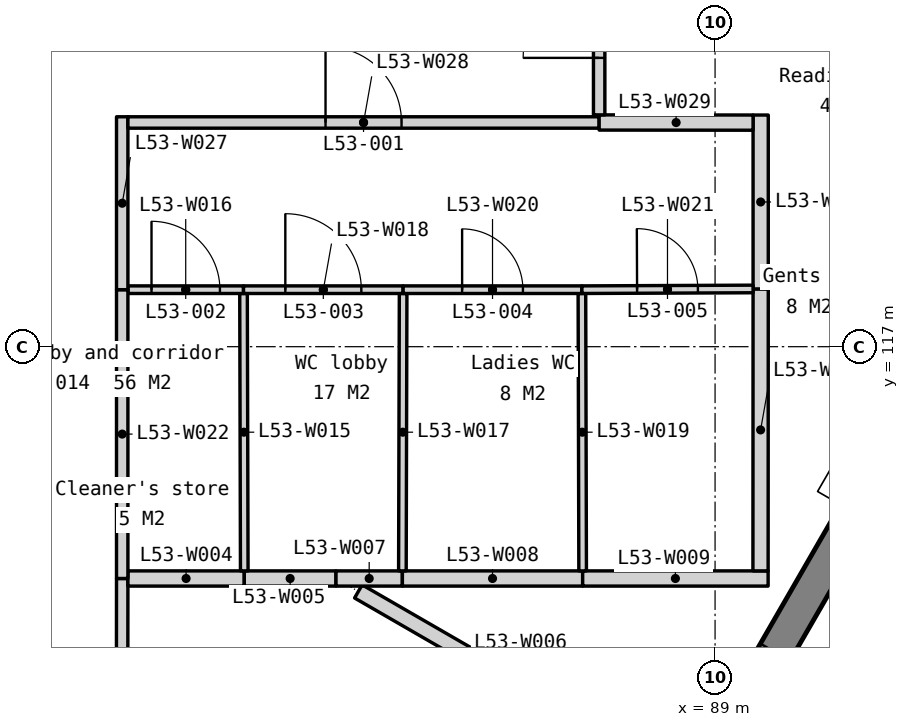
"""IFC4 building model, lengths in metres.
Left out: names, types, materials, properties, quantities, classifications, styles, units other than length and angle.
Written with IfcOpenShell. Run it as: python <this file> out.ifc"""

import sys

from ifc_helpers import new_model, si_unit, direction, frame, frame_2d, origin, place, context, subcontext, project, spatial, polyline, rectangle, outline, extrude, element, fill, save


model = new_model("IFC4")
c1 = context("Model", 3, precision=1e-05, world=origin(), true_north=direction((0.0, 1.0)))
c2 = subcontext(c1, "Body", "Model", "MODEL_VIEW")
j1 = project(units=[si_unit("LENGTHUNIT", "METRE"), si_unit("PLANEANGLEUNIT", "RADIAN")], contexts=[c1])
p1 = place(None, origin())
s1 = spatial("IfcSite", under=j1, at=p1, CompositionType="ELEMENT")
p2 = place(p1, origin())
s2 = spatial("IfcBuilding", under=s1, at=p2, CompositionType="ELEMENT")
p3 = place(p2, frame((0.0, 0.0, 211.4)))
s3 = spatial("IfcBuildingStorey", under=s2, at=p3, CompositionType="ELEMENT", Elevation=211.4)
p4 = place(p3, frame((81.505, 98.627, -0.15), z_axis=(0.0, 0.0, 1.0), x_axis=(0.500002199942, 0.866024133644, 0.0)))
e1 = element("IfcWall", 1, at=p4, inside=s3, PredefinedType="SOLIDWALL", context=c2, shape_type="SweptSolid", body=[
    extrude(outline(polyline([(38.729, 0.0), (38.729, 3.9), (0.0, 3.9), (0.0, 0.0), (38.729, 0.0)])), frame((0.0, 0.225, 0.0), z_axis=(0.0, -1.0, 0.0), x_axis=(1.0, 0.0, 0.0)), (0.0, 0.0, 1.0), 0.45),
])
p5 = place(p4, frame((2.791, 0.0, 0.95)))
e2 = element("IfcOpeningElement", 2, at=p5, cuts=e1, PredefinedType="OPENING", context=c2, shape_type="SweptSolid", body=[
    extrude(rectangle(XDim=1.8, YDim=2.2, at=frame_2d((0.9, 1.1))), frame((0.0, 0.235, 0.0), z_axis=(0.0, -1.0, 0.0), x_axis=(1.0, 0.0, 0.0)), (0.0, 0.0, 1.0), 0.47),
])
p6 = place(p4, frame((5.091, 0.0, 0.95)))
e3 = element("IfcOpeningElement", 3, at=p6, cuts=e1, PredefinedType="OPENING", context=c2, shape_type="SweptSolid", body=[
    extrude(rectangle(XDim=1.8, YDim=2.2, at=frame_2d((0.9, 1.1))), frame((0.0, 0.235, 0.0), z_axis=(0.0, -1.0, 0.0), x_axis=(1.0, 0.0, 0.0)), (0.0, 0.0, 1.0), 0.47),
])
p7 = place(p4, frame((12.473, 0.0, 0.95)))
e4 = element("IfcOpeningElement", 4, at=p7, cuts=e1, PredefinedType="OPENING", context=c2, shape_type="SweptSolid", body=[
    extrude(rectangle(XDim=1.8, YDim=2.2, at=frame_2d((0.9, 1.1))), frame((0.0, 0.235, 0.0), z_axis=(0.0, -1.0, 0.0), x_axis=(1.0, 0.0, 0.0)), (0.0, 0.0, 1.0), 0.47),
])
p8 = place(p4, frame((14.773, 0.0, 0.95)))
e5 = element("IfcOpeningElement", 5, at=p8, cuts=e1, PredefinedType="OPENING", context=c2, shape_type="SweptSolid", body=[
    extrude(rectangle(XDim=1.8, YDim=2.2, at=frame_2d((0.9, 1.1))), frame((0.0, 0.235, 0.0), z_axis=(0.0, -1.0, 0.0), x_axis=(1.0, 0.0, 0.0)), (0.0, 0.0, 1.0), 0.47),
])
p9 = place(p4, frame((22.156, 0.0, 0.95)))
e6 = element("IfcOpeningElement", 6, at=p9, cuts=e1, PredefinedType="OPENING", context=c2, shape_type="SweptSolid", body=[
    extrude(rectangle(XDim=1.8, YDim=2.2, at=frame_2d((0.9, 1.1))), frame((0.0, 0.235, 0.0), z_axis=(0.0, -1.0, 0.0), x_axis=(1.0, 0.0, 0.0)), (0.0, 0.0, 1.0), 0.47),
])
p10 = place(p4, frame((24.456, 0.0, 0.95)))
e7 = element("IfcOpeningElement", 7, at=p10, cuts=e1, PredefinedType="OPENING", context=c2, shape_type="SweptSolid", body=[
    extrude(rectangle(XDim=1.8, YDim=2.2, at=frame_2d((0.9, 1.1))), frame((0.0, 0.235, 0.0), z_axis=(0.0, -1.0, 0.0), x_axis=(1.0, 0.0, 0.0)), (0.0, 0.0, 1.0), 0.47),
])
p11 = place(p4, frame((31.838, 0.0, 0.95)))
e8 = element("IfcOpeningElement", 8, at=p11, cuts=e1, PredefinedType="OPENING", context=c2, shape_type="SweptSolid", body=[
    extrude(rectangle(XDim=1.8, YDim=2.2, at=frame_2d((0.9, 1.1))), frame((0.0, 0.235, 0.0), z_axis=(0.0, -1.0, 0.0), x_axis=(1.0, 0.0, 0.0)), (0.0, 0.0, 1.0), 0.47),
])
p12 = place(p4, frame((34.138, 0.0, 0.95)))
e9 = element("IfcOpeningElement", 9, at=p12, cuts=e1, PredefinedType="OPENING", context=c2, shape_type="SweptSolid", body=[
    extrude(rectangle(XDim=1.8, YDim=2.2, at=frame_2d((0.9, 1.1))), frame((0.0, 0.235, 0.0), z_axis=(0.0, -1.0, 0.0), x_axis=(1.0, 0.0, 0.0)), (0.0, 0.0, 1.0), 0.47),
])
p13 = place(p3, frame((81.198, 111.842, 0.0), z_axis=(0.0, 0.0, 1.0), x_axis=(0.000926461675, 0.999999570834, 0.0)))
e10 = element("IfcWall", 10, at=p13, inside=s3, PredefinedType="PARTITIONING", context=c2, shape_type="SweptSolid", body=[
    extrude(rectangle(XDim=2.108, YDim=0.15, at=frame_2d((1.054, 0.0))), origin(), (0.0, 0.0, 1.0), 3.75),
])
p14 = place(p3, frame((81.275, 113.95, 0.0), z_axis=(0.0, 0.0, 1.0), x_axis=(1.0, 0.0, 0.0)))
e11 = element("IfcWall", 11, at=p14, inside=s3, PredefinedType="PARTITIONING", context=c2, shape_type="SweptSolid", body=[
    extrude(rectangle(XDim=1.531, YDim=0.2, at=frame_2d((0.766, 0.0))), origin(), (0.0, 0.0, 1.0), 3.75),
])
p15 = place(p3, frame((82.806, 113.95, 0.0), z_axis=(0.0, 0.0, 1.0), x_axis=(1.0, 0.0, 0.0)))
e12 = element("IfcWall", 12, at=p15, inside=s3, PredefinedType="PARTITIONING", context=c2, shape_type="SweptSolid", body=[
    extrude(rectangle(XDim=1.207, YDim=0.2, at=frame_2d((0.604, 0.0))), origin(), (0.0, 0.0, 1.0), 3.75),
])
p16 = place(p3, frame((84.307, 113.78, 0.0), z_axis=(0.0, 0.0, 1.0), x_axis=(0.86601964755, -0.500009969958, 0.0)))
e13 = element("IfcWall", 13, at=p16, inside=s3, PredefinedType="PARTITIONING", context=c2, shape_type="SweptSolid", body=[
    extrude(rectangle(XDim=4.925, YDim=0.2, at=frame_2d((2.462, 0.0))), origin(), (0.0, 0.0, 1.0), 3.75),
])
p17 = place(p3, frame((84.013, 113.95, 0.0), z_axis=(0.0, 0.0, 1.0), x_axis=(1.0, 0.0, 0.0)))
e14 = element("IfcWall", 14, at=p17, inside=s3, PredefinedType="PARTITIONING", context=c2, shape_type="SweptSolid", body=[
    extrude(rectangle(XDim=0.873, YDim=0.2, at=frame_2d((0.437, 0.0))), origin(), (0.0, 0.0, 1.0), 3.75),
])
p18 = place(p3, frame((84.886, 113.95, 0.0), z_axis=(0.0, 0.0, 1.0), x_axis=(1.0, 0.0, 0.0)))
e15 = element("IfcWall", 15, at=p18, inside=s3, PredefinedType="PARTITIONING", context=c2, shape_type="SweptSolid", body=[
    extrude(rectangle(XDim=2.372, YDim=0.2, at=frame_2d((1.186, 0.0))), origin(), (0.0, 0.0, 1.0), 3.75),
])
p19 = place(p3, frame((87.258, 113.95, 0.0), z_axis=(0.0, 0.0, 1.0), x_axis=(1.0, 0.0, 0.0)))
e16 = element("IfcWall", 16, at=p19, inside=s3, PredefinedType="PARTITIONING", context=c2, shape_type="SweptSolid", body=[
    extrude(rectangle(XDim=2.44, YDim=0.2, at=frame_2d((1.22, 0.0))), origin(), (0.0, 0.0, 1.0), 3.75),
])
p20 = place(p3, frame((89.598, 114.05, 0.0), z_axis=(0.0, 0.0, 1.0), x_axis=(0.000526454257, 0.999999861423, 0.0)))
e17 = element("IfcWall", 17, at=p20, inside=s3, PredefinedType="PARTITIONING", context=c2, shape_type="SweptSolid", body=[
    extrude(rectangle(XDim=3.71, YDim=0.2, at=frame_2d((1.855, 0.0))), origin(), (0.0, 0.0, 1.0), 3.75),
])
p21 = place(p3, frame((89.6, 117.76, 0.0), z_axis=(0.0, 0.0, 1.0), x_axis=(0.0, 1.0, 0.0)))
e18 = element("IfcWall", 18, at=p21, inside=s3, PredefinedType="PARTITIONING", context=c2, shape_type="SweptSolid", body=[
    extrude(rectangle(XDim=2.288, YDim=0.2, at=frame_2d((1.144, 0.0))), origin(), (0.0, 0.0, 1.0), 3.75),
])
p22 = place(p3, frame((82.806, 114.05, 0.0), z_axis=(0.0, 0.0, 1.0), x_axis=(-0.002608686776, 0.999996597371, 0.0)))
e19 = element("IfcWall", 19, at=p22, inside=s3, PredefinedType="PARTITIONING", context=c2, shape_type="SweptSolid", body=[
    extrude(rectangle(XDim=3.65, YDim=0.1, at=frame_2d((1.825, 0.0))), origin(), (0.0, 0.0, 1.0), 3.75),
])
p23 = place(p3, frame((81.275, 117.75, 0.0), z_axis=(0.0, 0.0, 1.0), x_axis=(1.0, 0.0, 0.0)))
e20 = element("IfcWall", 20, at=p23, inside=s3, PredefinedType="PARTITIONING", context=c2, shape_type="SweptSolid", body=[
    extrude(rectangle(XDim=1.521, YDim=0.1, at=frame_2d((0.76, 0.0))), origin(), (0.0, 0.0, 1.0), 3.75),
])
p24 = place(p23, frame((0.311, 0.0, 0.0)))
e21 = element("IfcOpeningElement", 21, at=p24, cuts=e20, PredefinedType="OPENING", context=c2, shape_type="SweptSolid", body=[
    extrude(rectangle(XDim=0.9, YDim=2.1, at=frame_2d((0.45, 1.05))), frame((0.0, 0.06, 0.0), z_axis=(0.0, -1.0, 0.0), x_axis=(1.0, 0.0, 0.0)), (0.0, 0.0, 1.0), 0.12),
])
p25 = place(p3, frame((84.886, 114.05, 0.0), z_axis=(0.0, 0.0, 1.0), x_axis=(0.002608686776, 0.999996597371, 0.0)))
e22 = element("IfcWall", 22, at=p25, inside=s3, PredefinedType="PARTITIONING", context=c2, shape_type="SweptSolid", body=[
    extrude(rectangle(XDim=3.65, YDim=0.1, at=frame_2d((1.825, 0.0))), origin(), (0.0, 0.0, 1.0), 3.75),
])
p26 = place(p3, frame((82.796, 117.75, 0.0), z_axis=(0.0, 0.0, 1.0), x_axis=(1.0, 0.0, 0.0)))
e23 = element("IfcWall", 23, at=p26, inside=s3, PredefinedType="PARTITIONING", context=c2, shape_type="SweptSolid", body=[
    extrude(rectangle(XDim=2.1, YDim=0.1, at=frame_2d((1.05, 0.0))), origin(), (0.0, 0.0, 1.0), 3.75),
])
p27 = place(p26, frame((0.55, 0.0, 0.0)))
e24 = element("IfcOpeningElement", 24, at=p27, cuts=e23, PredefinedType="OPENING", context=c2, shape_type="SweptSolid", body=[
    extrude(rectangle(XDim=1.0, YDim=2.1, at=frame_2d((0.5, 1.05))), frame((0.0, 0.06, 0.0), z_axis=(0.0, -1.0, 0.0), x_axis=(1.0, 0.0, 0.0)), (0.0, 0.0, 1.0), 0.12),
])
p28 = place(p3, frame((87.258, 114.05, 0.0), z_axis=(0.0, 0.0, 1.0), x_axis=(-0.002675575707, 0.999996420641, 0.0)))
e25 = element("IfcWall", 25, at=p28, inside=s3, PredefinedType="PARTITIONING", context=c2, shape_type="SweptSolid", body=[
    extrude(rectangle(XDim=3.65, YDim=0.1, at=frame_2d((1.825, 0.0))), origin(), (0.0, 0.0, 1.0), 3.75),
])
p29 = place(p3, frame((84.896, 117.75, 0.0), z_axis=(0.0, 0.0, 1.0), x_axis=(1.0, 0.0, 0.0)))
e26 = element("IfcWall", 26, at=p29, inside=s3, PredefinedType="PARTITIONING", context=c2, shape_type="SweptSolid", body=[
    extrude(rectangle(XDim=2.352, YDim=0.1, at=frame_2d((1.176, 0.0))), origin(), (0.0, 0.0, 1.0), 3.75),
])
p30 = place(p29, frame((0.776, 0.0, 0.0)))
e27 = element("IfcOpeningElement", 27, at=p30, cuts=e26, PredefinedType="OPENING", context=c2, shape_type="SweptSolid", body=[
    extrude(rectangle(XDim=0.8, YDim=2.1, at=frame_2d((0.4, 1.05))), frame((0.0, 0.06, 0.0), z_axis=(0.0, -1.0, 0.0), x_axis=(1.0, 0.0, 0.0)), (0.0, 0.0, 1.0), 0.12),
])
p31 = place(p3, frame((87.248, 117.75, 0.0), z_axis=(0.0, 0.0, 1.0), x_axis=(0.999991061702, 0.004228062815, 0.0)))
e28 = element("IfcWall", 28, at=p31, inside=s3, PredefinedType="PARTITIONING", context=c2, shape_type="SweptSolid", body=[
    extrude(rectangle(XDim=2.252, YDim=0.1, at=frame_2d((1.126, 0.0))), origin(), (0.0, 0.0, 1.0), 3.75),
])
p32 = place(p31, frame((0.726, 0.0, 0.0)))
e29 = element("IfcOpeningElement", 29, at=p32, cuts=e28, PredefinedType="OPENING", context=c2, shape_type="SweptSolid", body=[
    extrude(rectangle(XDim=0.8, YDim=2.1, at=frame_2d((0.4, 1.05))), frame((0.0, 0.06, 0.0), z_axis=(0.0, -1.0, 0.0), x_axis=(1.0, 0.0, 0.0)), (0.0, 0.0, 1.0), 0.12),
])
p33 = place(p3, frame((81.2, 113.95, 0.0), z_axis=(0.0, 0.0, 1.0), x_axis=(0.0, 1.0, 0.0)))
e30 = element("IfcWall", 30, at=p33, inside=s3, PredefinedType="PARTITIONING", context=c2, shape_type="SweptSolid", body=[
    extrude(rectangle(XDim=3.8, YDim=0.15, at=frame_2d((1.9, 0.0))), origin(), (0.0, 0.0, 1.0), 3.75),
])
p34 = place(p3, frame((81.2, 117.75, 0.0), z_axis=(0.0, 0.0, 1.0), x_axis=(0.0, 1.0, 0.0)))
e31 = element("IfcWall", 31, at=p34, inside=s3, PredefinedType="PARTITIONING", context=c2, shape_type="SweptSolid", body=[
    extrude(rectangle(XDim=2.275, YDim=0.15, at=frame_2d((1.137, 0.0))), origin(), (0.0, 0.0, 1.0), 3.75),
])
p35 = place(p3, frame((81.275, 119.95, 0.0), z_axis=(0.0, 0.0, 1.0), x_axis=(1.0, 0.0, 0.0)))
e32 = element("IfcWall", 32, at=p35, inside=s3, PredefinedType="PARTITIONING", context=c2, shape_type="SweptSolid", body=[
    extrude(rectangle(XDim=6.2, YDim=0.15, at=frame_2d((3.1, 0.0))), origin(), (0.0, 0.0, 1.0), 3.75),
])
p36 = place(p35, frame((2.6, 0.0, 0.0)))
e33 = element("IfcOpeningElement", 33, at=p36, cuts=e32, PredefinedType="OPENING", context=c2, shape_type="SweptSolid", body=[
    extrude(rectangle(XDim=1.0, YDim=2.1, at=frame_2d((0.5, 1.05))), frame((0.0, 0.085, 0.0), z_axis=(0.0, -1.0, 0.0), x_axis=(1.0, 0.0, 0.0)), (0.0, 0.0, 1.0), 0.17),
])
p37 = place(p3, frame((87.475, 119.95, 0.0), z_axis=(0.0, 0.0, 1.0), x_axis=(0.999999534819, -0.00096455224, 0.0)))
e34 = element("IfcWall", 34, at=p37, inside=s3, PredefinedType="PARTITIONING", context=c2, shape_type="SweptSolid", body=[
    extrude(rectangle(XDim=2.025, YDim=0.2, at=frame_2d((1.012, 0.0))), origin(), (0.0, 0.0, 1.0), 3.75),
])
p38 = place(p3, frame((87.475, 120.05, 0.0), z_axis=(0.0, 0.0, 1.0), x_axis=(0.0, 1.0, 0.0)))
e35 = element("IfcWall", 35, at=p38, inside=s3, PredefinedType="PARTITIONING", context=c2, shape_type="SweptSolid", body=[
    extrude(rectangle(XDim=2.5, YDim=0.15, at=frame_2d((1.25, 0.0))), origin(), (0.0, 0.0, 1.0), 3.75),
])
p39 = place(p38, frame((0.75, 0.0, 0.0)))
e36 = element("IfcOpeningElement", 36, at=p39, cuts=e35, PredefinedType="OPENING", context=c2, shape_type="SweptSolid", body=[
    extrude(rectangle(XDim=1.0, YDim=2.1, at=frame_2d((0.5, 1.05))), frame((0.0, 0.085, 0.0), z_axis=(0.0, -1.0, 0.0), x_axis=(1.0, 0.0, 0.0)), (0.0, 0.0, 1.0), 0.17),
])
p40 = place(p36, origin())
e37 = element("IfcDoor", 37, at=p40, inside=s3, OperationType="SINGLE_SWING_LEFT", PredefinedType="DOOR", context=c2, shape_type="SweptSolid", body=[
    extrude(rectangle(XDim=1.0, YDim=2.1, at=frame_2d((0.5, 1.05))), frame((0.0, 0.025, 0.0), z_axis=(0.0, -1.0, 0.0), x_axis=(1.0, 0.0, 0.0)), (0.0, 0.0, 1.0), 0.05),
])
fill(e33, e37)
p41 = place(p24, origin())
e38 = element("IfcDoor", 38, at=p41, inside=s3, OperationType="SINGLE_SWING_LEFT", PredefinedType="DOOR", context=c2, shape_type="SweptSolid", body=[
    extrude(rectangle(XDim=0.9, YDim=2.1, at=frame_2d((0.45, 1.05))), frame((0.0, 0.025, 0.0), z_axis=(0.0, -1.0, 0.0), x_axis=(1.0, 0.0, 0.0)), (0.0, 0.0, 1.0), 0.05),
])
fill(e21, e38)
p42 = place(p27, origin())
e39 = element("IfcDoor", 39, at=p42, inside=s3, OperationType="SINGLE_SWING_LEFT", PredefinedType="DOOR", context=c2, shape_type="SweptSolid", body=[
    extrude(rectangle(XDim=1.0, YDim=2.1, at=frame_2d((0.5, 1.05))), frame((0.0, 0.025, 0.0), z_axis=(0.0, -1.0, 0.0), x_axis=(1.0, 0.0, 0.0)), (0.0, 0.0, 1.0), 0.05),
])
fill(e24, e39)
p43 = place(p30, origin())
e40 = element("IfcDoor", 40, at=p43, inside=s3, OperationType="SINGLE_SWING_LEFT", PredefinedType="DOOR", context=c2, shape_type="SweptSolid", body=[
    extrude(rectangle(XDim=0.8, YDim=2.1, at=frame_2d((0.4, 1.05))), frame((0.0, 0.025, 0.0), z_axis=(0.0, -1.0, 0.0), x_axis=(1.0, 0.0, 0.0)), (0.0, 0.0, 1.0), 0.05),
])
fill(e27, e40)
p44 = place(p32, origin())
e41 = element("IfcDoor", 41, at=p44, inside=s3, OperationType="SINGLE_SWING_LEFT", PredefinedType="DOOR", context=c2, shape_type="SweptSolid", body=[
    extrude(rectangle(XDim=0.8, YDim=2.1, at=frame_2d((0.4, 1.05))), frame((0.0, 0.025, 0.0), z_axis=(0.0, -1.0, 0.0), x_axis=(1.0, 0.0, 0.0)), (0.0, 0.0, 1.0), 0.05),
])
fill(e29, e41)
p45 = place(p39, origin())
e42 = element("IfcDoor", 42, at=p45, inside=s3, OperationType="SINGLE_SWING_LEFT", PredefinedType="DOOR", context=c2, shape_type="SweptSolid", body=[
    extrude(rectangle(XDim=1.0, YDim=2.1, at=frame_2d((0.5, 1.05))), frame((0.0, 0.025, 0.0), z_axis=(0.0, -1.0, 0.0), x_axis=(1.0, 0.0, 0.0)), (0.0, 0.0, 1.0), 0.05),
])
fill(e36, e42)
save(model, sys.argv[1])
